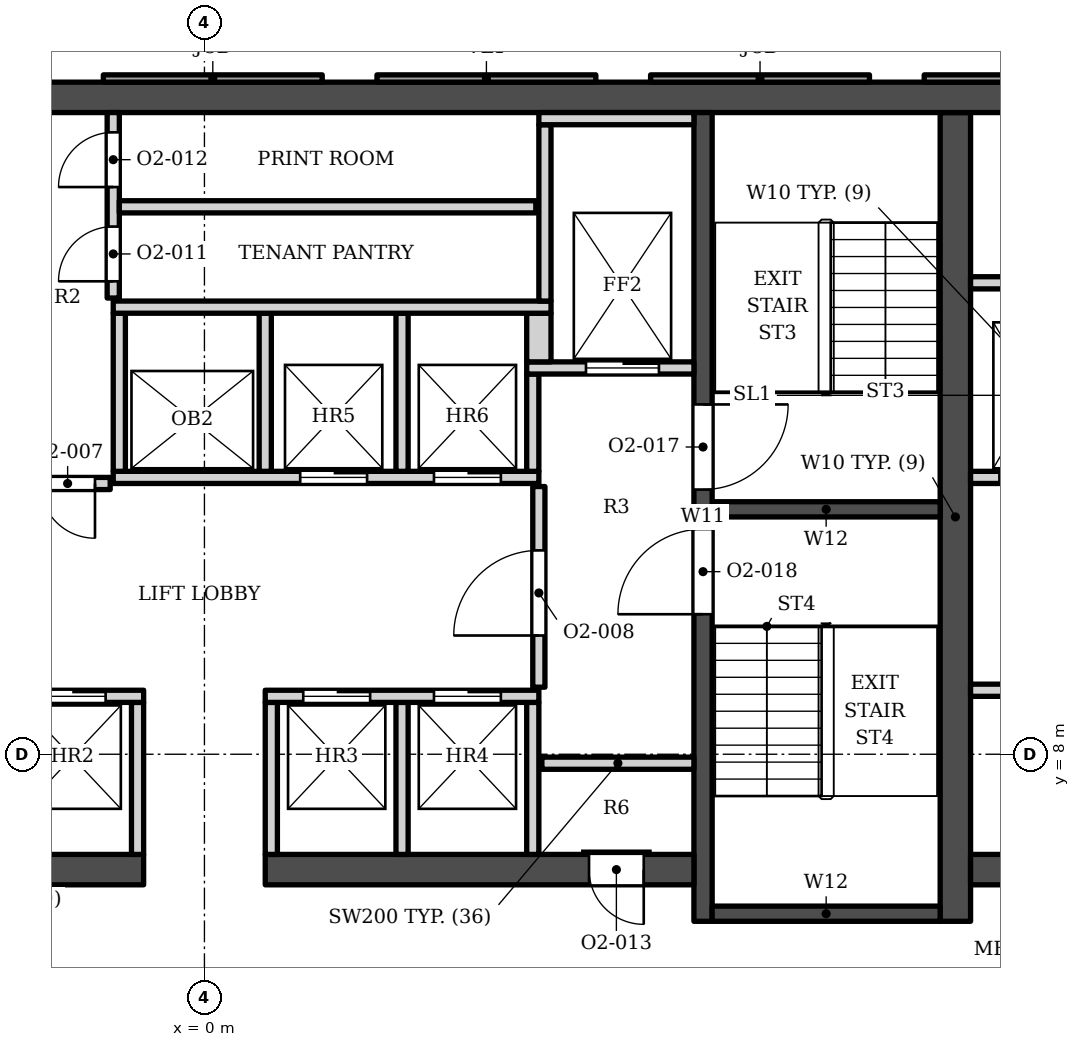
"""IFC4 building model, lengths in metres.
Left out: names, types, materials, properties, quantities, classifications, styles, units other than length and angle.
Written with IfcOpenShell. Run it as: python <this file> out.ifc"""

import sys

from ifc_helpers import new_model, si_unit, direction, frame, frame_2d, origin, place, context, subcontext, project, spatial, polyline, rectangle, outline, extrude, element, fill, save


model = new_model("IFC4")
c1 = context("Model", 3, precision=1e-05, world=origin(), true_north=direction((0.0, 1.0)))
c2 = subcontext(c1, "Body", "Model", "MODEL_VIEW")
j1 = project(units=[si_unit("LENGTHUNIT", "METRE"), si_unit("PLANEANGLEUNIT", "RADIAN")], contexts=[c1])
p1 = place(None, origin())
s1 = spatial("IfcSite", under=j1, at=p1, CompositionType="ELEMENT")
p2 = place(p1, origin())
s2 = spatial("IfcBuilding", under=s1, at=p2, CompositionType="ELEMENT")
p3 = place(p2, frame((0.0, 0.0, 156.3)))
s3 = spatial("IfcBuildingStorey", under=s2, at=p3, CompositionType="ELEMENT", Elevation=156.3)
p4 = place(p3, frame((-15.1, 18.802, 0.0), z_axis=(0.0, 0.0, 1.0), x_axis=(1.0, 0.0, 0.0)))
e1 = element("IfcWall", 1, at=p4, inside=s3, PredefinedType="SHEAR", context=c2, shape_type="SweptSolid", body=[
    extrude(rectangle(XDim=30.2, YDim=0.5, at=frame_2d((15.1, 0.0))), origin(), (0.0, 0.0, 1.0), 3.9),
])
p5 = place(p3, frame((12.35, 5.253, 0.0), z_axis=(0.0, 0.0, 1.0), x_axis=(0.0, 1.0, 0.0)))
e2 = element("IfcWall", 2, at=p5, inside=s3, PredefinedType="SHEAR", context=c2, shape_type="SweptSolid", body=[
    extrude(rectangle(XDim=13.3, YDim=0.5, at=frame_2d((6.65, 0.0))), origin(), (0.0, 0.0, 1.0), 3.9),
])
p6 = place(p3, frame((8.2, 5.253, 0.0), z_axis=(0.0, 0.0, 1.0), x_axis=(0.0, 1.0, 0.0)))
e3 = element("IfcWall", 3, at=p6, inside=s3, PredefinedType="SHEAR", context=c2, shape_type="SweptSolid", body=[
    extrude(rectangle(XDim=13.3, YDim=0.3, at=frame_2d((6.65, 0.0))), origin(), (0.0, 0.0, 1.0), 3.9),
])
p7 = place(p6, frame((7.1, 0.0, 0.0)))
e4 = element("IfcOpeningElement", 4, at=p7, cuts=e3, PredefinedType="OPENING", context=c2, shape_type="SweptSolid", body=[
    extrude(rectangle(XDim=1.4, YDim=2.1, at=frame_2d((0.7, 1.05))), frame((0.0, 0.16, 0.0), z_axis=(0.0, -1.0, 0.0), x_axis=(1.0, 0.0, 0.0)), (0.0, 0.0, 1.0), 0.32),
])
p8 = place(p6, frame((5.05, 0.0, 0.0)))
e5 = element("IfcOpeningElement", 5, at=p8, cuts=e3, PredefinedType="OPENING", context=c2, shape_type="SweptSolid", body=[
    extrude(rectangle(XDim=1.4, YDim=2.1, at=frame_2d((0.7, 1.05))), frame((0.0, 0.16, 0.0), z_axis=(0.0, -1.0, 0.0), x_axis=(1.0, 0.0, 0.0)), (0.0, 0.0, 1.0), 0.32),
])
for number, where, z_axis, x_axis in (
    (6, (8.35, 12.028, 0.0), (0.0, 0.0, 1.0), (1.0, 0.0, 0.0)),
    (7, (8.35, 5.378, 0.0), (0.0, 0.0, 1.0), (1.0, 0.0, 0.0)),
):
    element("IfcWall", number, at=place(p3, frame(where, z_axis=z_axis, x_axis=x_axis)), inside=s3, PredefinedType="SHEAR", context=c2, shape_type="SweptSolid", body=[
        extrude(rectangle(XDim=3.75, YDim=0.25, at=frame_2d((1.875, 0.0))), origin(), (0.0, 0.0, 1.0), 3.9),
    ])
p9 = place(p3, frame((-8.05, 6.103, 0.0), z_axis=(0.0, 0.0, 1.0), x_axis=(1.0, 0.0, 0.0)))
e8 = element("IfcWall", 8, at=p9, inside=s3, PredefinedType="SHEAR", context=c2, shape_type="SweptSolid", body=[
    extrude(rectangle(XDim=7.05, YDim=0.5, at=frame_2d((3.525, 0.0))), origin(), (0.0, 0.0, 1.0), 3.9),
])
p10 = place(p9, frame((0.825, 0.0, 0.0)))
e9 = element("IfcOpeningElement", 9, at=p10, cuts=e8, PredefinedType="OPENING", context=c2, shape_type="SweptSolid", body=[
    extrude(rectangle(XDim=0.9, YDim=2.1, at=frame_2d((0.45, 1.05))), frame((0.0, 0.26, 0.0), z_axis=(0.0, -1.0, 0.0), x_axis=(1.0, 0.0, 0.0)), (0.0, 0.0, 1.0), 0.52),
])
p11 = place(p3, frame((1.0, 6.103, 0.0), z_axis=(0.0, 0.0, 1.0), x_axis=(1.0, 0.0, 0.0)))
e10 = element("IfcWall", 10, at=p11, inside=s3, PredefinedType="SHEAR", context=c2, shape_type="SweptSolid", body=[
    extrude(rectangle(XDim=7.05, YDim=0.5, at=frame_2d((3.525, 0.0))), origin(), (0.0, 0.0, 1.0), 3.9),
])
p12 = place(p11, frame((5.325, 0.0, 0.0)))
e11 = element("IfcOpeningElement", 11, at=p12, cuts=e10, PredefinedType="OPENING", context=c2, shape_type="SweptSolid", body=[
    extrude(rectangle(XDim=0.9, YDim=2.1, at=frame_2d((0.45, 1.05))), frame((0.0, 0.26, 0.0), z_axis=(0.0, -1.0, 0.0), x_axis=(1.0, 0.0, 0.0)), (0.0, 0.0, 1.0), 0.52),
])
p13 = place(p3, frame((12.6, 6.103, 0.0), z_axis=(0.0, 0.0, 1.0), x_axis=(1.0, 0.0, 0.0)))
e12 = element("IfcWall", 12, at=p13, inside=s3, PredefinedType="SHEAR", context=c2, shape_type="SweptSolid", body=[
    extrude(rectangle(XDim=2.5, YDim=0.5, at=frame_2d((1.25, 0.0))), origin(), (0.0, 0.0, 1.0), 3.9),
])
p14 = place(p3, origin())
e13 = element("IfcWall", 13, at=p14, inside=s3, PredefinedType="ELEMENTEDWALL", context=c2, shape_type="SweptSolid", body=[
    extrude(outline(polyline([(11.837, 19.173), (11.837, 19.052), (15.437, 19.052), (15.437, 19.173), (11.837, 19.173)])), origin(), (0.0, 0.0, 1.0), 3.0),
])
p15 = place(p3, origin())
e14 = element("IfcWall", 14, at=p15, inside=s3, PredefinedType="SOLIDWALL", context=c2, shape_type="SweptSolid", body=[
    extrude(outline(polyline([(7.337, 19.173), (7.337, 19.052), (10.938, 19.052), (10.938, 19.173), (7.337, 19.173)])), origin(), (0.0, 0.0, 1.0), 3.0),
])
p16 = place(p3, origin())
e15 = element("IfcWall", 15, at=p16, inside=s3, PredefinedType="ELEMENTEDWALL", context=c2, shape_type="SweptSolid", body=[
    extrude(outline(polyline([(2.837, 19.173), (2.837, 19.052), (6.438, 19.052), (6.438, 19.173), (2.837, 19.173)])), origin(), (0.0, 0.0, 1.0), 3.0),
])
p17 = place(p3, origin())
e16 = element("IfcWall", 16, at=p17, inside=s3, PredefinedType="SOLIDWALL", context=c2, shape_type="SweptSolid", body=[
    extrude(outline(polyline([(-1.663, 19.173), (-1.663, 19.052), (1.938, 19.052), (1.938, 19.173), (-1.663, 19.173)])), origin(), (0.0, 0.0, 1.0), 3.0),
])
for number, where, z_axis, x_axis in (
    (17, (-1.1, 6.353, 0.0), (0.0, 0.0, 1.0), (0.0, 1.0, 0.0)),
    (18, (1.1, 6.353, 0.0), (0.0, 0.0, 1.0), (0.0, 1.0, 0.0)),
    (19, (3.25, 6.353, 0.0), (0.0, 0.0, 1.0), (0.0, 1.0, 0.0)),
    (20, (5.4, 6.353, 0.0), (0.0, 0.0, 1.0), (0.0, 1.0, 0.0)),
    (21, (5.55, 7.853, 0.0), (0.0, 0.0, 1.0), (1.0, 0.0, 0.0)),
):
    element("IfcWall", number, at=place(p3, frame(where, z_axis=z_axis, x_axis=x_axis)), inside=s3, PredefinedType="SOLIDWALL", context=c2, shape_type="SweptSolid", body=[
        extrude(rectangle(XDim=2.5, YDim=0.2, at=frame_2d((1.25, 0.0))), origin(), (0.0, 0.0, 1.0), 3.73),
    ])
p18 = place(p3, frame((-5.5, 8.953, 0.0), z_axis=(0.0, 0.0, 1.0), x_axis=(1.0, 0.0, 0.0)))
e22 = element("IfcWall", 22, at=p18, inside=s3, PredefinedType="SOLIDWALL", context=c2, shape_type="SweptSolid", body=[
    extrude(rectangle(XDim=4.5, YDim=0.2, at=frame_2d((2.25, 0.0))), origin(), (0.0, 0.0, 1.0), 3.73),
])
p19 = place(p18, frame((0.625, 0.0, 0.0)))
e23 = element("IfcOpeningElement", 23, at=p19, cuts=e22, PredefinedType="OPENING", context=c2, shape_type="SweptSolid", body=[
    extrude(rectangle(XDim=1.1, YDim=2.1, at=frame_2d((0.55, 1.05))), frame((0.0, 0.11, 0.0), z_axis=(0.0, -1.0, 0.0), x_axis=(1.0, 0.0, 0.0)), (0.0, 0.0, 1.0), 0.22),
])
p20 = place(p18, frame((2.775, 0.0, 0.0)))
e24 = element("IfcOpeningElement", 24, at=p20, cuts=e22, PredefinedType="OPENING", context=c2, shape_type="SweptSolid", body=[
    extrude(rectangle(XDim=1.1, YDim=2.1, at=frame_2d((0.55, 1.05))), frame((0.0, 0.11, 0.0), z_axis=(0.0, -1.0, 0.0), x_axis=(1.0, 0.0, 0.0)), (0.0, 0.0, 1.0), 0.22),
])
p21 = place(p3, frame((1.0, 8.953, 0.0), z_axis=(0.0, 0.0, 1.0), x_axis=(1.0, 0.0, 0.0)))
e25 = element("IfcWall", 25, at=p21, inside=s3, PredefinedType="SOLIDWALL", context=c2, shape_type="SweptSolid", body=[
    extrude(rectangle(XDim=4.5, YDim=0.2, at=frame_2d((2.25, 0.0))), origin(), (0.0, 0.0, 1.0), 3.73),
])
p22 = place(p21, frame((0.625, 0.0, 0.0)))
e26 = element("IfcOpeningElement", 26, at=p22, cuts=e25, PredefinedType="OPENING", context=c2, shape_type="SweptSolid", body=[
    extrude(rectangle(XDim=1.1, YDim=2.1, at=frame_2d((0.55, 1.05))), frame((0.0, 0.11, 0.0), z_axis=(0.0, -1.0, 0.0), x_axis=(1.0, 0.0, 0.0)), (0.0, 0.0, 1.0), 0.22),
])
p23 = place(p21, frame((2.775, 0.0, 0.0)))
e27 = element("IfcOpeningElement", 27, at=p23, cuts=e25, PredefinedType="OPENING", context=c2, shape_type="SweptSolid", body=[
    extrude(rectangle(XDim=1.1, YDim=2.1, at=frame_2d((0.55, 1.05))), frame((0.0, 0.11, 0.0), z_axis=(0.0, -1.0, 0.0), x_axis=(1.0, 0.0, 0.0)), (0.0, 0.0, 1.0), 0.22),
])
p24 = place(p3, frame((12.6, 9.052, 0.0), z_axis=(0.0, 0.0, 1.0), x_axis=(1.0, 0.0, 0.0)))
e28 = element("IfcWall", 28, at=p24, inside=s3, PredefinedType="PARTITIONING", context=c2, shape_type="SweptSolid", body=[
    extrude(rectangle(XDim=2.5, YDim=0.2, at=frame_2d((1.25, 0.0))), origin(), (0.0, 0.0, 1.0), 3.73),
])
p25 = place(p3, frame((5.5, 9.103, 0.0), z_axis=(0.0, 0.0, 1.0), x_axis=(0.0, 1.0, 0.0)))
e29 = element("IfcWall", 29, at=p25, inside=s3, PredefinedType="SOLIDWALL", context=c2, shape_type="SweptSolid", body=[
    extrude(rectangle(XDim=3.3, YDim=0.2, at=frame_2d((1.65, 0.0))), origin(), (0.0, 0.0, 1.0), 3.73),
])
p26 = place(p25, frame((0.85, 0.0, 0.0)))
e30 = element("IfcOpeningElement", 30, at=p26, cuts=e29, PredefinedType="OPENING", context=c2, shape_type="SweptSolid", body=[
    extrude(rectangle(XDim=1.4, YDim=2.1, at=frame_2d((0.7, 1.05))), frame((0.0, 0.11, 0.0), z_axis=(0.0, -1.0, 0.0), x_axis=(1.0, 0.0, 0.0)), (0.0, 0.0, 1.0), 0.22),
])
p27 = place(p3, frame((-2.95, 12.453, 0.0), z_axis=(0.0, 0.0, 1.0), x_axis=(1.0, 0.0, 0.0)))
e31 = element("IfcWall", 31, at=p27, inside=s3, PredefinedType="SOLIDWALL", context=c2, shape_type="SweptSolid", body=[
    extrude(rectangle(XDim=1.4, YDim=0.2, at=frame_2d((0.7, 0.0))), origin(), (0.0, 0.0, 1.0), 3.73),
])
p28 = place(p27, frame((0.25, 0.0, 0.0)))
e32 = element("IfcOpeningElement", 32, at=p28, cuts=e31, PredefinedType="OPENING", context=c2, shape_type="SweptSolid", body=[
    extrude(rectangle(XDim=0.9, YDim=2.1, at=frame_2d((0.45, 1.05))), frame((0.0, 0.11, 0.0), z_axis=(0.0, -1.0, 0.0), x_axis=(1.0, 0.0, 0.0)), (0.0, 0.0, 1.0), 0.22),
])
p29 = place(p3, frame((-1.5, 12.552, 0.0), z_axis=(0.0, 0.0, 1.0), x_axis=(1.0, 0.0, 0.0)))
e33 = element("IfcWall", 33, at=p29, inside=s3, PredefinedType="SOLIDWALL", context=c2, shape_type="SweptSolid", body=[
    extrude(rectangle(XDim=7.0, YDim=0.2, at=frame_2d((3.5, 0.0))), origin(), (0.0, 0.0, 1.0), 3.73),
])
p30 = place(p29, frame((3.075, 0.0, 0.0)))
e34 = element("IfcOpeningElement", 34, at=p30, cuts=e33, PredefinedType="OPENING", context=c2, shape_type="SweptSolid", body=[
    extrude(rectangle(XDim=1.1, YDim=2.1, at=frame_2d((0.55, 1.05))), frame((0.0, 0.11, 0.0), z_axis=(0.0, -1.0, 0.0), x_axis=(1.0, 0.0, 0.0)), (0.0, 0.0, 1.0), 0.22),
])
p31 = place(p29, frame((5.275, 0.0, 0.0)))
e35 = element("IfcOpeningElement", 35, at=p31, cuts=e33, PredefinedType="OPENING", context=c2, shape_type="SweptSolid", body=[
    extrude(rectangle(XDim=1.1, YDim=2.1, at=frame_2d((0.55, 1.05))), frame((0.0, 0.11, 0.0), z_axis=(0.0, -1.0, 0.0), x_axis=(1.0, 0.0, 0.0)), (0.0, 0.0, 1.0), 0.22),
])
p32 = place(p3, frame((12.6, 12.552, 0.0), z_axis=(0.0, 0.0, 1.0), x_axis=(1.0, 0.0, 0.0)))
e36 = element("IfcWall", 36, at=p32, inside=s3, PredefinedType="SOLIDWALL", context=c2, shape_type="SweptSolid", body=[
    extrude(rectangle(XDim=2.15, YDim=0.2, at=frame_2d((1.075, 0.0))), origin(), (0.0, 0.0, 1.0), 3.73),
])
p33 = place(p32, frame((0.475, 0.0, 0.0)))
e37 = element("IfcOpeningElement", 37, at=p33, cuts=e36, PredefinedType="OPENING", context=c2, shape_type="SweptSolid", body=[
    extrude(rectangle(XDim=1.2, YDim=2.1, at=frame_2d((0.6, 1.05))), frame((0.0, 0.11, 0.0), z_axis=(0.0, -1.0, 0.0), x_axis=(1.0, 0.0, 0.0)), (0.0, 0.0, 1.0), 0.22),
])
for number, where, z_axis, x_axis in (
    (38, (-1.4, 12.653, 0.0), (0.0, 0.0, 1.0), (0.0, 1.0, 0.0)),
    (39, (1.0, 12.653, 0.0), (0.0, 0.0, 1.0), (0.0, 1.0, 0.0)),
    (40, (3.25, 12.653, 0.0), (0.0, 0.0, 1.0), (0.0, 1.0, 0.0)),
):
    element("IfcWall", number, at=place(p3, frame(where, z_axis=z_axis, x_axis=x_axis)), inside=s3, PredefinedType="SOLIDWALL", context=c2, shape_type="SweptSolid", body=[
        extrude(rectangle(XDim=2.6, YDim=0.2, at=frame_2d((1.3, 0.0))), origin(), (0.0, 0.0, 1.0), 3.73),
    ])
p34 = place(p3, frame((5.4, 12.653, 0.0), z_axis=(0.0, 0.0, 1.0), x_axis=(0.0, 1.0, 0.0)))
e41 = element("IfcWall", 41, at=p34, inside=s3, PredefinedType="SOLIDWALL", context=c2, shape_type="SweptSolid", body=[
    extrude(rectangle(XDim=1.6, YDim=0.2, at=frame_2d((0.8, 0.0))), origin(), (0.0, 0.0, 1.0), 3.73),
])
p35 = place(p3, frame((5.3, 14.353, 0.0), z_axis=(0.0, 0.0, 1.0), x_axis=(1.0, 0.0, 0.0)))
e42 = element("IfcWall", 42, at=p35, inside=s3, PredefinedType="SOLIDWALL", context=c2, shape_type="SweptSolid", body=[
    extrude(rectangle(XDim=2.75, YDim=0.2, at=frame_2d((1.375, 0.0))), origin(), (0.0, 0.0, 1.0), 3.73),
])
p36 = place(p35, frame((0.975, 0.0, 0.0)))
e43 = element("IfcOpeningElement", 43, at=p36, cuts=e42, PredefinedType="OPENING", context=c2, shape_type="SweptSolid", body=[
    extrude(rectangle(XDim=1.2, YDim=2.1, at=frame_2d((0.6, 1.05))), frame((0.0, 0.11, 0.0), z_axis=(0.0, -1.0, 0.0), x_axis=(1.0, 0.0, 0.0)), (0.0, 0.0, 1.0), 0.22),
])
p37 = place(p3, frame((5.5, 14.453, 0.0), z_axis=(0.0, 0.0, 1.0), x_axis=(0.0, 1.0, 0.0)))
e44 = element("IfcWall", 44, at=p37, inside=s3, PredefinedType="SOLIDWALL", context=c2, shape_type="SweptSolid", body=[
    extrude(rectangle(XDim=0.8, YDim=0.4, at=frame_2d((0.4, 0.0))), origin(), (0.0, 0.0, 1.0), 3.73),
])
p38 = place(p3, frame((-1.5, 15.353, 0.0), z_axis=(0.0, 0.0, 1.0), x_axis=(1.0, 0.0, 0.0)))
e45 = element("IfcWall", 45, at=p38, inside=s3, PredefinedType="SOLIDWALL", context=c2, shape_type="SweptSolid", body=[
    extrude(rectangle(XDim=7.2, YDim=0.2, at=frame_2d((3.6, 0.0))), origin(), (0.0, 0.0, 1.0), 3.73),
])
p39 = place(p3, frame((5.6, 15.453, 0.0), z_axis=(0.0, 0.0, 1.0), x_axis=(0.0, 1.0, 0.0)))
e46 = element("IfcWall", 46, at=p39, inside=s3, PredefinedType="SOLIDWALL", context=c2, shape_type="SweptSolid", body=[
    extrude(rectangle(XDim=2.9, YDim=0.2, at=frame_2d((1.45, 0.0))), origin(), (0.0, 0.0, 1.0), 3.73),
])
p40 = place(p3, frame((-1.5, 15.503, 0.0), z_axis=(0.0, 0.0, 1.0), x_axis=(0.0, 1.0, 0.0)))
e47 = element("IfcWall", 47, at=p40, inside=s3, PredefinedType="SOLIDWALL", context=c2, shape_type="SweptSolid", body=[
    extrude(rectangle(XDim=3.05, YDim=0.2, at=frame_2d((1.525, 0.0))), origin(), (0.0, 0.0, 1.0), 3.73),
])
p41 = place(p40, frame((0.275, 0.0, 0.0)))
e48 = element("IfcOpeningElement", 48, at=p41, cuts=e47, PredefinedType="OPENING", context=c2, shape_type="SweptSolid", body=[
    extrude(rectangle(XDim=0.9, YDim=2.1, at=frame_2d((0.45, 1.05))), frame((0.0, 0.11, 0.0), z_axis=(0.0, -1.0, 0.0), x_axis=(1.0, 0.0, 0.0)), (0.0, 0.0, 1.0), 0.22),
])
p42 = place(p40, frame((1.825, 0.0, 0.0)))
e49 = element("IfcOpeningElement", 49, at=p42, cuts=e47, PredefinedType="OPENING", context=c2, shape_type="SweptSolid", body=[
    extrude(rectangle(XDim=0.9, YDim=2.1, at=frame_2d((0.45, 1.05))), frame((0.0, 0.11, 0.0), z_axis=(0.0, -1.0, 0.0), x_axis=(1.0, 0.0, 0.0)), (0.0, 0.0, 1.0), 0.22),
])
p43 = place(p3, frame((12.6, 15.753, 0.0), z_axis=(0.0, 0.0, 1.0), x_axis=(1.0, 0.0, 0.0)))
e50 = element("IfcWall", 50, at=p43, inside=s3, PredefinedType="SOLIDWALL", context=c2, shape_type="SweptSolid", body=[
    extrude(rectangle(XDim=2.15, YDim=0.2, at=frame_2d((1.075, 0.0))), origin(), (0.0, 0.0, 1.0), 3.73),
])
p44 = place(p3, frame((-1.4, 17.003, 0.0), z_axis=(0.0, 0.0, 1.0), x_axis=(1.0, 0.0, 0.0)))
e51 = element("IfcWall", 51, at=p44, inside=s3, PredefinedType="SOLIDWALL", context=c2, shape_type="SweptSolid", body=[
    extrude(rectangle(XDim=6.85, YDim=0.2, at=frame_2d((3.425, 0.0))), origin(), (0.0, 0.0, 1.0), 3.73),
])
p45 = place(p3, frame((5.5, 18.453, 0.0), z_axis=(0.0, 0.0, 1.0), x_axis=(1.0, 0.0, 0.0)))
e52 = element("IfcWall", 52, at=p45, inside=s3, PredefinedType="SOLIDWALL", context=c2, shape_type="SweptSolid", body=[
    extrude(rectangle(XDim=2.55, YDim=0.2, at=frame_2d((1.275, 0.0))), origin(), (0.0, 0.0, 1.0), 3.73),
])
p46 = place(p20, origin())
e53 = element("IfcDoor", 53, at=p46, inside=s3, OperationType="DOUBLE_DOOR_SLIDING", PredefinedType="DOOR", context=c2, shape_type="SweptSolid", body=[
    extrude(rectangle(XDim=1.1, YDim=2.1, at=frame_2d((0.55, 1.05))), frame((0.0, 0.025, 0.0), z_axis=(0.0, -1.0, 0.0), x_axis=(1.0, 0.0, 0.0)), (0.0, 0.0, 1.0), 0.05),
])
fill(e24, e53)
p47 = place(p22, origin())
e54 = element("IfcDoor", 54, at=p47, inside=s3, OperationType="DOUBLE_DOOR_SLIDING", PredefinedType="DOOR", context=c2, shape_type="SweptSolid", body=[
    extrude(rectangle(XDim=1.1, YDim=2.1, at=frame_2d((0.55, 1.05))), frame((0.0, 0.025, 0.0), z_axis=(0.0, -1.0, 0.0), x_axis=(1.0, 0.0, 0.0)), (0.0, 0.0, 1.0), 0.05),
])
fill(e26, e54)
p48 = place(p23, origin())
e55 = element("IfcDoor", 55, at=p48, inside=s3, OperationType="DOUBLE_DOOR_SLIDING", PredefinedType="DOOR", context=c2, shape_type="SweptSolid", body=[
    extrude(rectangle(XDim=1.1, YDim=2.1, at=frame_2d((0.55, 1.05))), frame((0.0, 0.025, 0.0), z_axis=(0.0, -1.0, 0.0), x_axis=(1.0, 0.0, 0.0)), (0.0, 0.0, 1.0), 0.05),
])
fill(e27, e55)
p49 = place(p30, origin())
e56 = element("IfcDoor", 56, at=p49, inside=s3, OperationType="DOUBLE_DOOR_SLIDING", PredefinedType="DOOR", context=c2, shape_type="SweptSolid", body=[
    extrude(rectangle(XDim=1.1, YDim=2.1, at=frame_2d((0.55, 1.05))), frame((0.0, 0.025, 0.0), z_axis=(0.0, -1.0, 0.0), x_axis=(1.0, 0.0, 0.0)), (0.0, 0.0, 1.0), 0.05),
])
fill(e34, e56)
p50 = place(p31, origin())
e57 = element("IfcDoor", 57, at=p50, inside=s3, OperationType="DOUBLE_DOOR_SLIDING", PredefinedType="DOOR", context=c2, shape_type="SweptSolid", body=[
    extrude(rectangle(XDim=1.1, YDim=2.1, at=frame_2d((0.55, 1.05))), frame((0.0, 0.025, 0.0), z_axis=(0.0, -1.0, 0.0), x_axis=(1.0, 0.0, 0.0)), (0.0, 0.0, 1.0), 0.05),
])
fill(e35, e57)
p51 = place(p36, origin())
e58 = element("IfcDoor", 58, at=p51, inside=s3, OperationType="DOUBLE_DOOR_SLIDING", PredefinedType="DOOR", context=c2, shape_type="SweptSolid", body=[
    extrude(rectangle(XDim=1.2, YDim=2.1, at=frame_2d((0.6, 1.05))), frame((0.0, 0.025, 0.0), z_axis=(0.0, -1.0, 0.0), x_axis=(1.0, 0.0, 0.0)), (0.0, 0.0, 1.0), 0.05),
])
fill(e43, e58)
p52 = place(p33, origin())
e59 = element("IfcDoor", 59, at=p52, inside=s3, OperationType="DOUBLE_DOOR_SLIDING", PredefinedType="DOOR", context=c2, shape_type="SweptSolid", body=[
    extrude(rectangle(XDim=1.2, YDim=2.1, at=frame_2d((0.6, 1.05))), frame((0.0, 0.025, 0.0), z_axis=(0.0, -1.0, 0.0), x_axis=(1.0, 0.0, 0.0)), (0.0, 0.0, 1.0), 0.05),
])
fill(e37, e59)
p53 = place(p7, origin())
e60 = element("IfcDoor", 60, at=p53, inside=s3, OperationType="SINGLE_SWING_RIGHT", PredefinedType="DOOR", context=c2, shape_type="SweptSolid", body=[
    extrude(rectangle(XDim=1.4, YDim=2.1, at=frame_2d((0.7, 1.05))), frame((0.0, 0.025, 0.0), z_axis=(0.0, -1.0, 0.0), x_axis=(1.0, 0.0, 0.0)), (0.0, 0.0, 1.0), 0.05),
])
fill(e4, e60)
p54 = place(p8, origin())
e61 = element("IfcDoor", 61, at=p54, inside=s3, OperationType="SINGLE_SWING_LEFT", PredefinedType="DOOR", context=c2, shape_type="SweptSolid", body=[
    extrude(rectangle(XDim=1.4, YDim=2.1, at=frame_2d((0.7, 1.05))), frame((0.0, 0.025, 0.0), z_axis=(0.0, -1.0, 0.0), x_axis=(1.0, 0.0, 0.0)), (0.0, 0.0, 1.0), 0.05),
])
fill(e5, e61)
p55 = place(p28, origin())
e62 = element("IfcDoor", 62, at=p55, inside=s3, OperationType="SINGLE_SWING_RIGHT", PredefinedType="DOOR", context=c2, shape_type="SweptSolid", body=[
    extrude(rectangle(XDim=0.9, YDim=2.1, at=frame_2d((0.45, 1.05))), frame((0.0, 0.025, 0.0), z_axis=(0.0, -1.0, 0.0), x_axis=(1.0, 0.0, 0.0)), (0.0, 0.0, 1.0), 0.05),
])
fill(e32, e62)
p56 = place(p26, origin())
e63 = element("IfcDoor", 63, at=p56, inside=s3, OperationType="SINGLE_SWING_LEFT", PredefinedType="DOOR", context=c2, shape_type="SweptSolid", body=[
    extrude(rectangle(XDim=1.4, YDim=2.1, at=frame_2d((0.7, 1.05))), frame((0.0, 0.025, 0.0), z_axis=(0.0, -1.0, 0.0), x_axis=(1.0, 0.0, 0.0)), (0.0, 0.0, 1.0), 0.05),
])
fill(e30, e63)
p57 = place(p41, origin())
e64 = element("IfcDoor", 64, at=p57, inside=s3, OperationType="SINGLE_SWING_LEFT", PredefinedType="DOOR", context=c2, shape_type="SweptSolid", body=[
    extrude(rectangle(XDim=0.9, YDim=2.1, at=frame_2d((0.45, 1.05))), frame((0.0, 0.025, 0.0), z_axis=(0.0, -1.0, 0.0), x_axis=(1.0, 0.0, 0.0)), (0.0, 0.0, 1.0), 0.05),
])
fill(e48, e64)
p58 = place(p42, origin())
e65 = element("IfcDoor", 65, at=p58, inside=s3, OperationType="SINGLE_SWING_LEFT", PredefinedType="DOOR", context=c2, shape_type="SweptSolid", body=[
    extrude(rectangle(XDim=0.9, YDim=2.1, at=frame_2d((0.45, 1.05))), frame((0.0, 0.025, 0.0), z_axis=(0.0, -1.0, 0.0), x_axis=(1.0, 0.0, 0.0)), (0.0, 0.0, 1.0), 0.05),
])
fill(e49, e65)
p59 = place(p12, origin())
e66 = element("IfcDoor", 66, at=p59, inside=s3, OperationType="SINGLE_SWING_RIGHT", PredefinedType="DOOR", context=c2, shape_type="SweptSolid", body=[
    extrude(rectangle(XDim=0.9, YDim=2.1, at=frame_2d((0.45, 1.05))), frame((0.0, 0.025, 0.0), z_axis=(0.0, -1.0, 0.0), x_axis=(1.0, 0.0, 0.0)), (0.0, 0.0, 1.0), 0.05),
])
fill(e11, e66)
save(model, sys.argv[1])
